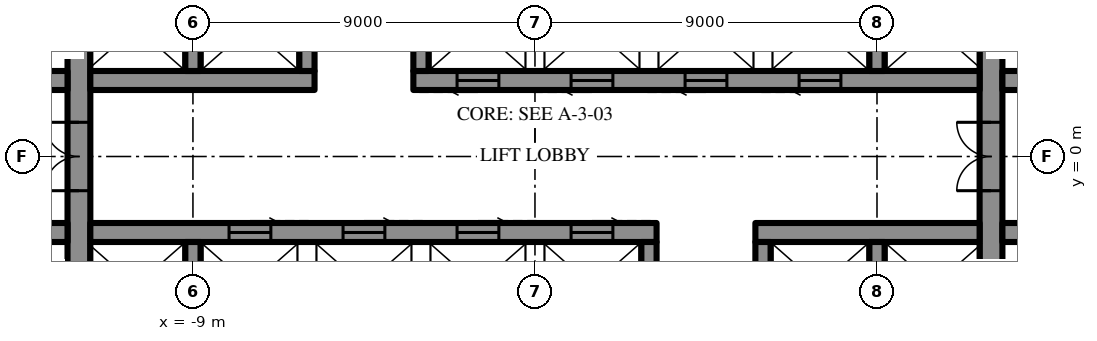
"""IFC4 building model, lengths in metres.
Left out: names, types, materials, properties, quantities, classifications, styles, units other than length and angle.
Written with IfcOpenShell. Run it as: python <this file> out.ifc"""

import sys

from ifc_helpers import new_model, si_unit, direction, frame, frame_2d, origin, place, context, subcontext, project, spatial, rectangle, extrude, element, fill, save


model = new_model("IFC4")
c1 = context("Model", 3, precision=1e-05, world=origin(), true_north=direction((0.0, 1.0)))
c2 = subcontext(c1, "Body", "Model", "MODEL_VIEW")
j1 = project(units=[si_unit("LENGTHUNIT", "METRE"), si_unit("PLANEANGLEUNIT", "RADIAN")], contexts=[c1])
p1 = place(None, origin())
s1 = spatial("IfcSite", under=j1, at=p1, CompositionType="ELEMENT")
p2 = place(p1, origin())
s2 = spatial("IfcBuilding", under=s1, at=p2, CompositionType="ELEMENT")
p3 = place(p2, frame((0.0, 0.0, 286.9)))
s3 = spatial("IfcBuildingStorey", under=s2, at=p3, CompositionType="ELEMENT", Elevation=286.9)
p4 = place(p3, frame((12.0, -10.7, 0.0), z_axis=(0.0, 0.0, 1.0), x_axis=(0.0, 1.0, 0.0)))
e1 = element("IfcWall", 1, at=p4, inside=s3, PredefinedType="SHEAR", context=c2, shape_type="SweptSolid", body=[
    extrude(rectangle(XDim=21.4, YDim=0.6, at=frame_2d((10.7, 0.0))), origin(), (0.0, 0.0, 1.0), 4.2),
])
p5 = place(p4, frame((9.8, 0.0, 0.0)))
e2 = element("IfcOpeningElement", 2, at=p5, cuts=e1, PredefinedType="OPENING", context=c2, shape_type="SweptSolid", body=[
    extrude(rectangle(XDim=1.8, YDim=2.4, at=frame_2d((0.9, 1.2))), frame((0.0, 0.31, 0.0), z_axis=(0.0, -1.0, 0.0), x_axis=(1.0, 0.0, 0.0)), (0.0, 0.0, 1.0), 0.62),
])
p6 = place(p3, frame((-12.0, -10.7, 0.0), z_axis=(0.0, 0.0, 1.0), x_axis=(0.0, 1.0, 0.0)))
e3 = element("IfcWall", 3, at=p6, inside=s3, PredefinedType="SHEAR", context=c2, shape_type="SweptSolid", body=[
    extrude(rectangle(XDim=21.4, YDim=0.6, at=frame_2d((10.7, 0.0))), origin(), (0.0, 0.0, 1.0), 4.2),
])
p7 = place(p6, frame((9.8, 0.0, 0.0)))
e4 = element("IfcOpeningElement", 4, at=p7, cuts=e3, PredefinedType="OPENING", context=c2, shape_type="SweptSolid", body=[
    extrude(rectangle(XDim=1.8, YDim=2.4, at=frame_2d((0.9, 1.2))), frame((0.0, 0.31, 0.0), z_axis=(0.0, -1.0, 0.0), x_axis=(1.0, 0.0, 0.0)), (0.0, 0.0, 1.0), 0.62),
])
p8 = place(p3, frame((-14.5, 2.0, 0.0), z_axis=(0.0, 0.0, 1.0), x_axis=(1.0, 0.0, 0.0)))
e5 = element("IfcWall", 5, at=p8, inside=s3, PredefinedType="SHEAR", context=c2, shape_type="SweptSolid", body=[
    extrude(rectangle(XDim=2.2, YDim=0.5, at=frame_2d((1.1, 0.0))), origin(), (0.0, 0.0, 1.0), 4.2),
])
p9 = place(p8, frame((0.5, 0.0, 0.0)))
e6 = element("IfcOpeningElement", 6, at=p9, cuts=e5, PredefinedType="OPENING", context=c2, shape_type="SweptSolid", body=[
    extrude(rectangle(XDim=0.9, YDim=2.2, at=frame_2d((0.45, 1.1))), frame((0.0, 0.26, 0.0), z_axis=(0.0, -1.0, 0.0), x_axis=(1.0, 0.0, 0.0)), (0.0, 0.0, 1.0), 0.52),
])
p10 = place(p3, frame((-11.7, 2.0, 0.0), z_axis=(0.0, 0.0, 1.0), x_axis=(1.0, 0.0, 0.0)))
e7 = element("IfcWall", 7, at=p10, inside=s3, PredefinedType="SHEAR", context=c2, shape_type="SweptSolid", body=[
    extrude(rectangle(XDim=5.9, YDim=0.5, at=frame_2d((2.95, 0.0))), origin(), (0.0, 0.0, 1.0), 4.2),
])
p11 = place(p3, frame((-3.2, 2.0, 0.0), z_axis=(0.0, 0.0, 1.0), x_axis=(1.0, 0.0, 0.0)))
e8 = element("IfcWall", 8, at=p11, inside=s3, PredefinedType="SHEAR", context=c2, shape_type="SweptSolid", body=[
    extrude(rectangle(XDim=14.9, YDim=0.5, at=frame_2d((7.45, 0.0))), origin(), (0.0, 0.0, 1.0), 4.2),
])
p12 = place(p11, frame((1.15, 0.0, 0.0)))
e9 = element("IfcOpeningElement", 9, at=p12, cuts=e8, PredefinedType="OPENING", context=c2, shape_type="SweptSolid", body=[
    extrude(rectangle(XDim=1.1, YDim=2.2, at=frame_2d((0.55, 1.1))), frame((0.0, 0.26, 0.0), z_axis=(0.0, -1.0, 0.0), x_axis=(1.0, 0.0, 0.0)), (0.0, 0.0, 1.0), 0.52),
])
p13 = place(p11, frame((4.15, 0.0, 0.0)))
e10 = element("IfcOpeningElement", 10, at=p13, cuts=e8, PredefinedType="OPENING", context=c2, shape_type="SweptSolid", body=[
    extrude(rectangle(XDim=1.1, YDim=2.2, at=frame_2d((0.55, 1.1))), frame((0.0, 0.26, 0.0), z_axis=(0.0, -1.0, 0.0), x_axis=(1.0, 0.0, 0.0)), (0.0, 0.0, 1.0), 0.52),
])
p14 = place(p11, frame((7.15, 0.0, 0.0)))
e11 = element("IfcOpeningElement", 11, at=p14, cuts=e8, PredefinedType="OPENING", context=c2, shape_type="SweptSolid", body=[
    extrude(rectangle(XDim=1.1, YDim=2.2, at=frame_2d((0.55, 1.1))), frame((0.0, 0.26, 0.0), z_axis=(0.0, -1.0, 0.0), x_axis=(1.0, 0.0, 0.0)), (0.0, 0.0, 1.0), 0.52),
])
p15 = place(p11, frame((10.15, 0.0, 0.0)))
e12 = element("IfcOpeningElement", 12, at=p15, cuts=e8, PredefinedType="OPENING", context=c2, shape_type="SweptSolid", body=[
    extrude(rectangle(XDim=1.1, YDim=2.2, at=frame_2d((0.55, 1.1))), frame((0.0, 0.26, 0.0), z_axis=(0.0, -1.0, 0.0), x_axis=(1.0, 0.0, 0.0)), (0.0, 0.0, 1.0), 0.52),
])
p16 = place(p3, frame((12.3, 2.0, 0.0), z_axis=(0.0, 0.0, 1.0), x_axis=(1.0, 0.0, 0.0)))
e13 = element("IfcWall", 13, at=p16, inside=s3, PredefinedType="SHEAR", context=c2, shape_type="SweptSolid", body=[
    extrude(rectangle(XDim=2.2, YDim=0.5, at=frame_2d((1.1, 0.0))), origin(), (0.0, 0.0, 1.0), 4.2),
])
p17 = place(p16, frame((0.8, 0.0, 0.0)))
e14 = element("IfcOpeningElement", 14, at=p17, cuts=e13, PredefinedType="OPENING", context=c2, shape_type="SweptSolid", body=[
    extrude(rectangle(XDim=0.9, YDim=2.2, at=frame_2d((0.45, 1.1))), frame((0.0, 0.26, 0.0), z_axis=(0.0, -1.0, 0.0), x_axis=(1.0, 0.0, 0.0)), (0.0, 0.0, 1.0), 0.52),
])
for number, where, z_axis, x_axis in (
    (15, (-9.0, 2.25, 0.0), (0.0, 0.0, 1.0), (0.0, 1.0, 0.0)),
    (16, (-6.0, 2.25, 0.0), (0.0, 0.0, 1.0), (0.0, 1.0, 0.0)),
    (17, (-3.0, 2.25, 0.0), (0.0, 0.0, 1.0), (0.0, 1.0, 0.0)),
    (18, (9.0, 2.25, 0.0), (0.0, 0.0, 1.0), (0.0, 1.0, 0.0)),
):
    element("IfcWall", number, at=place(p3, frame(where, z_axis=z_axis, x_axis=x_axis)), inside=s3, PredefinedType="SHEAR", context=c2, shape_type="SweptSolid", body=[
        extrude(rectangle(XDim=2.3, YDim=0.4, at=frame_2d((1.15, 0.0))), origin(), (0.0, 0.0, 1.0), 4.2),
    ])
p18 = place(p3, frame((14.5, -2.0, 0.0), z_axis=(0.0, 0.0, 1.0), x_axis=(-1.0, 0.0, 0.0)))
e19 = element("IfcWall", 19, at=p18, inside=s3, PredefinedType="SHEAR", context=c2, shape_type="SweptSolid", body=[
    extrude(rectangle(XDim=2.2, YDim=0.5, at=frame_2d((1.1, 0.0))), origin(), (0.0, 0.0, 1.0), 4.2),
])
p19 = place(p18, frame((0.5, 0.0, 0.0)))
e20 = element("IfcOpeningElement", 20, at=p19, cuts=e19, PredefinedType="OPENING", context=c2, shape_type="SweptSolid", body=[
    extrude(rectangle(XDim=0.9, YDim=2.2, at=frame_2d((0.45, 1.1))), frame((0.0, 0.26, 0.0), z_axis=(0.0, -1.0, 0.0), x_axis=(1.0, 0.0, 0.0)), (0.0, 0.0, 1.0), 0.52),
])
p20 = place(p3, frame((11.7, -2.0, 0.0), z_axis=(0.0, 0.0, 1.0), x_axis=(-1.0, 0.0, 0.0)))
e21 = element("IfcWall", 21, at=p20, inside=s3, PredefinedType="SHEAR", context=c2, shape_type="SweptSolid", body=[
    extrude(rectangle(XDim=5.9, YDim=0.5, at=frame_2d((2.95, 0.0))), origin(), (0.0, 0.0, 1.0), 4.2),
])
p21 = place(p3, frame((3.2, -2.0, 0.0), z_axis=(0.0, 0.0, 1.0), x_axis=(-1.0, 0.0, 0.0)))
e22 = element("IfcWall", 22, at=p21, inside=s3, PredefinedType="SHEAR", context=c2, shape_type="SweptSolid", body=[
    extrude(rectangle(XDim=14.9, YDim=0.5, at=frame_2d((7.45, 0.0))), origin(), (0.0, 0.0, 1.0), 4.2),
])
p22 = place(p21, frame((1.15, 0.0, 0.0)))
e23 = element("IfcOpeningElement", 23, at=p22, cuts=e22, PredefinedType="OPENING", context=c2, shape_type="SweptSolid", body=[
    extrude(rectangle(XDim=1.1, YDim=2.2, at=frame_2d((0.55, 1.1))), frame((0.0, 0.26, 0.0), z_axis=(0.0, -1.0, 0.0), x_axis=(1.0, 0.0, 0.0)), (0.0, 0.0, 1.0), 0.52),
])
p23 = place(p21, frame((4.15, 0.0, 0.0)))
e24 = element("IfcOpeningElement", 24, at=p23, cuts=e22, PredefinedType="OPENING", context=c2, shape_type="SweptSolid", body=[
    extrude(rectangle(XDim=1.1, YDim=2.2, at=frame_2d((0.55, 1.1))), frame((0.0, 0.26, 0.0), z_axis=(0.0, -1.0, 0.0), x_axis=(1.0, 0.0, 0.0)), (0.0, 0.0, 1.0), 0.52),
])
p24 = place(p21, frame((7.15, 0.0, 0.0)))
e25 = element("IfcOpeningElement", 25, at=p24, cuts=e22, PredefinedType="OPENING", context=c2, shape_type="SweptSolid", body=[
    extrude(rectangle(XDim=1.1, YDim=2.2, at=frame_2d((0.55, 1.1))), frame((0.0, 0.26, 0.0), z_axis=(0.0, -1.0, 0.0), x_axis=(1.0, 0.0, 0.0)), (0.0, 0.0, 1.0), 0.52),
])
p25 = place(p21, frame((10.15, 0.0, 0.0)))
e26 = element("IfcOpeningElement", 26, at=p25, cuts=e22, PredefinedType="OPENING", context=c2, shape_type="SweptSolid", body=[
    extrude(rectangle(XDim=1.1, YDim=2.2, at=frame_2d((0.55, 1.1))), frame((0.0, 0.26, 0.0), z_axis=(0.0, -1.0, 0.0), x_axis=(1.0, 0.0, 0.0)), (0.0, 0.0, 1.0), 0.52),
])
p26 = place(p3, frame((-12.3, -2.0, 0.0), z_axis=(0.0, 0.0, 1.0), x_axis=(-1.0, 0.0, 0.0)))
e27 = element("IfcWall", 27, at=p26, inside=s3, PredefinedType="SHEAR", context=c2, shape_type="SweptSolid", body=[
    extrude(rectangle(XDim=2.2, YDim=0.5, at=frame_2d((1.1, 0.0))), origin(), (0.0, 0.0, 1.0), 4.2),
])
p27 = place(p26, frame((0.8, 0.0, 0.0)))
e28 = element("IfcOpeningElement", 28, at=p27, cuts=e27, PredefinedType="OPENING", context=c2, shape_type="SweptSolid", body=[
    extrude(rectangle(XDim=0.9, YDim=2.2, at=frame_2d((0.45, 1.1))), frame((0.0, 0.26, 0.0), z_axis=(0.0, -1.0, 0.0), x_axis=(1.0, 0.0, 0.0)), (0.0, 0.0, 1.0), 0.52),
])
for number, where, z_axis, x_axis in (
    (29, (9.0, -2.25, 0.0), (0.0, 0.0, 1.0), (0.0, -1.0, 0.0)),
    (30, (6.0, -2.25, 0.0), (0.0, 0.0, 1.0), (0.0, -1.0, 0.0)),
    (31, (3.0, -2.25, 0.0), (0.0, 0.0, 1.0), (0.0, -1.0, 0.0)),
    (32, (-9.0, -2.25, 0.0), (0.0, 0.0, 1.0), (0.0, -1.0, 0.0)),
):
    element("IfcWall", number, at=place(p3, frame(where, z_axis=z_axis, x_axis=x_axis)), inside=s3, PredefinedType="SHEAR", context=c2, shape_type="SweptSolid", body=[
        extrude(rectangle(XDim=2.3, YDim=0.4, at=frame_2d((1.15, 0.0))), origin(), (0.0, 0.0, 1.0), 4.2),
    ])
p28 = place(p5, origin())
e33 = element("IfcDoor", 33, at=p28, inside=s3, OperationType="DOUBLE_DOOR_SINGLE_SWING", PredefinedType="DOOR", context=c2, shape_type="SweptSolid", body=[
    extrude(rectangle(XDim=1.8, YDim=2.4, at=frame_2d((0.9, 1.2))), frame((0.0, 0.025, 0.0), z_axis=(0.0, -1.0, 0.0), x_axis=(1.0, 0.0, 0.0)), (0.0, 0.0, 1.0), 0.05),
])
fill(e2, e33)
p29 = place(p7, origin())
e34 = element("IfcDoor", 34, at=p29, inside=s3, OperationType="DOUBLE_DOOR_SINGLE_SWING", PredefinedType="DOOR", context=c2, shape_type="SweptSolid", body=[
    extrude(rectangle(XDim=1.8, YDim=2.4, at=frame_2d((0.9, 1.2))), frame((0.0, 0.025, 0.0), z_axis=(0.0, -1.0, 0.0), x_axis=(1.0, 0.0, 0.0)), (0.0, 0.0, 1.0), 0.05),
])
fill(e4, e34)
p30 = place(p12, frame((1.1, 0.0, 0.0), z_axis=(0.0, 0.0, 1.0), x_axis=(-1.0, 0.0, 0.0)))
e35 = element("IfcDoor", 35, at=p30, inside=s3, OperationType="SLIDING_TO_LEFT", PredefinedType="DOOR", context=c2, shape_type="SweptSolid", body=[
    extrude(rectangle(XDim=1.1, YDim=2.2, at=frame_2d((0.55, 1.1))), frame((0.0, 0.025, 0.0), z_axis=(0.0, -1.0, 0.0), x_axis=(1.0, 0.0, 0.0)), (0.0, 0.0, 1.0), 0.05),
])
fill(e9, e35)
p31 = place(p13, frame((1.1, 0.0, 0.0), z_axis=(0.0, 0.0, 1.0), x_axis=(-1.0, 0.0, 0.0)))
e36 = element("IfcDoor", 36, at=p31, inside=s3, OperationType="SLIDING_TO_LEFT", PredefinedType="DOOR", context=c2, shape_type="SweptSolid", body=[
    extrude(rectangle(XDim=1.1, YDim=2.2, at=frame_2d((0.55, 1.1))), frame((0.0, 0.025, 0.0), z_axis=(0.0, -1.0, 0.0), x_axis=(1.0, 0.0, 0.0)), (0.0, 0.0, 1.0), 0.05),
])
fill(e10, e36)
p32 = place(p14, frame((1.1, 0.0, 0.0), z_axis=(0.0, 0.0, 1.0), x_axis=(-1.0, 0.0, 0.0)))
e37 = element("IfcDoor", 37, at=p32, inside=s3, OperationType="SLIDING_TO_LEFT", PredefinedType="DOOR", context=c2, shape_type="SweptSolid", body=[
    extrude(rectangle(XDim=1.1, YDim=2.2, at=frame_2d((0.55, 1.1))), frame((0.0, 0.025, 0.0), z_axis=(0.0, -1.0, 0.0), x_axis=(1.0, 0.0, 0.0)), (0.0, 0.0, 1.0), 0.05),
])
fill(e11, e37)
p33 = place(p15, frame((1.1, 0.0, 0.0), z_axis=(0.0, 0.0, 1.0), x_axis=(-1.0, 0.0, 0.0)))
e38 = element("IfcDoor", 38, at=p33, inside=s3, OperationType="SLIDING_TO_LEFT", PredefinedType="DOOR", context=c2, shape_type="SweptSolid", body=[
    extrude(rectangle(XDim=1.1, YDim=2.2, at=frame_2d((0.55, 1.1))), frame((0.0, 0.025, 0.0), z_axis=(0.0, -1.0, 0.0), x_axis=(1.0, 0.0, 0.0)), (0.0, 0.0, 1.0), 0.05),
])
fill(e12, e38)
p34 = place(p22, frame((1.1, 0.0, 0.0), z_axis=(0.0, 0.0, 1.0), x_axis=(-1.0, 0.0, 0.0)))
e39 = element("IfcDoor", 39, at=p34, inside=s3, OperationType="SLIDING_TO_LEFT", PredefinedType="DOOR", context=c2, shape_type="SweptSolid", body=[
    extrude(rectangle(XDim=1.1, YDim=2.2, at=frame_2d((0.55, 1.1))), frame((0.0, 0.025, 0.0), z_axis=(0.0, -1.0, 0.0), x_axis=(1.0, 0.0, 0.0)), (0.0, 0.0, 1.0), 0.05),
])
fill(e23, e39)
p35 = place(p23, frame((1.1, 0.0, 0.0), z_axis=(0.0, 0.0, 1.0), x_axis=(-1.0, 0.0, 0.0)))
e40 = element("IfcDoor", 40, at=p35, inside=s3, OperationType="SLIDING_TO_LEFT", PredefinedType="DOOR", context=c2, shape_type="SweptSolid", body=[
    extrude(rectangle(XDim=1.1, YDim=2.2, at=frame_2d((0.55, 1.1))), frame((0.0, 0.025, 0.0), z_axis=(0.0, -1.0, 0.0), x_axis=(1.0, 0.0, 0.0)), (0.0, 0.0, 1.0), 0.05),
])
fill(e24, e40)
p36 = place(p24, frame((1.1, 0.0, 0.0), z_axis=(0.0, 0.0, 1.0), x_axis=(-1.0, 0.0, 0.0)))
e41 = element("IfcDoor", 41, at=p36, inside=s3, OperationType="SLIDING_TO_LEFT", PredefinedType="DOOR", context=c2, shape_type="SweptSolid", body=[
    extrude(rectangle(XDim=1.1, YDim=2.2, at=frame_2d((0.55, 1.1))), frame((0.0, 0.025, 0.0), z_axis=(0.0, -1.0, 0.0), x_axis=(1.0, 0.0, 0.0)), (0.0, 0.0, 1.0), 0.05),
])
fill(e25, e41)
p37 = place(p25, frame((1.1, 0.0, 0.0), z_axis=(0.0, 0.0, 1.0), x_axis=(-1.0, 0.0, 0.0)))
e42 = element("IfcDoor", 42, at=p37, inside=s3, OperationType="SLIDING_TO_LEFT", PredefinedType="DOOR", context=c2, shape_type="SweptSolid", body=[
    extrude(rectangle(XDim=1.1, YDim=2.2, at=frame_2d((0.55, 1.1))), frame((0.0, 0.025, 0.0), z_axis=(0.0, -1.0, 0.0), x_axis=(1.0, 0.0, 0.0)), (0.0, 0.0, 1.0), 0.05),
])
fill(e26, e42)
save(model, sys.argv[1])
